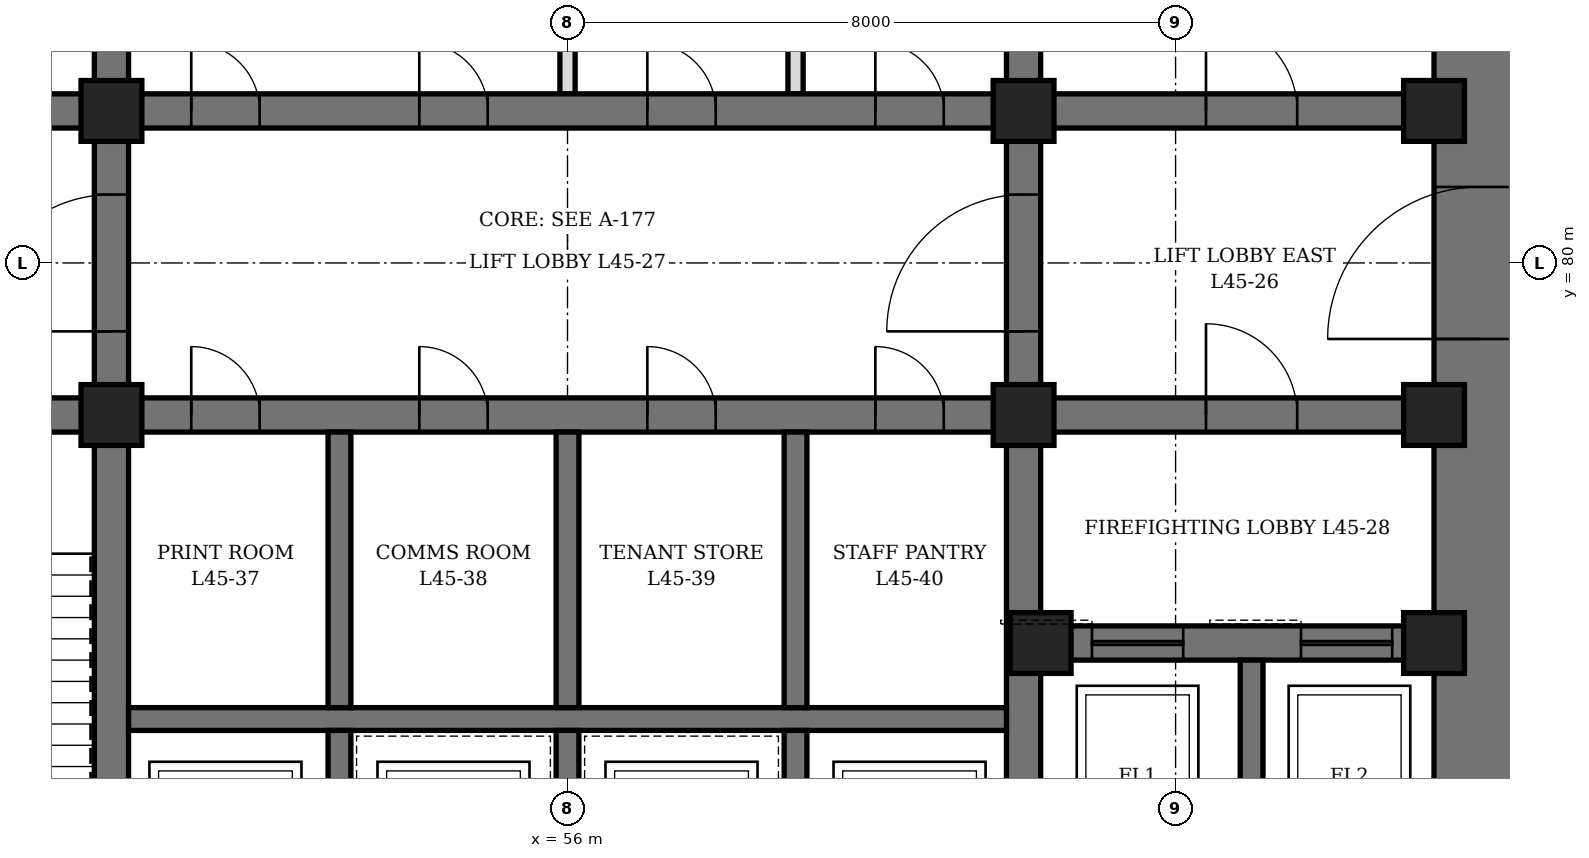
"""IFC4 building model, lengths in metres.
Left out: names, types, materials, properties, quantities, classifications, styles, units other than length and angle.
Written with IfcOpenShell. Run it as: python <this file> out.ifc"""

import sys

from ifc_helpers import new_model, si_unit, direction, frame, frame_2d, origin, origin_2d, place, context, subcontext, project, spatial, rectangle, hollow_rectangle, extrude, element, fill, save


model = new_model("IFC4")
c1 = context("Model", 3, precision=1e-05, world=origin(), true_north=direction((0.0, 1.0)))
c2 = subcontext(c1, "Body", "Model", "MODEL_VIEW")
j1 = project(units=[si_unit("LENGTHUNIT", "METRE"), si_unit("PLANEANGLEUNIT", "RADIAN")], contexts=[c1])
p1 = place(None, origin())
s1 = spatial("IfcSite", under=j1, at=p1, CompositionType="ELEMENT")
p2 = place(p1, origin())
s2 = spatial("IfcBuilding", under=s1, at=p2, CompositionType="ELEMENT")
p3 = place(p2, frame((0.0, 0.0, 202.3)))
s3 = spatial("IfcBuildingStorey", under=s2, at=p3, CompositionType="ELEMENT", Elevation=202.3)
p4 = place(p3, frame((68.0, 70.4, 0.0), z_axis=(0.0, 0.0, 1.0), x_axis=(0.0, 1.0, 0.0)))
e1 = element("IfcWall", 1, at=p4, inside=s3, PredefinedType="SHEAR", context=c2, shape_type="SweptSolid", body=[
    extrude(rectangle(XDim=19.2, YDim=1.2, at=frame_2d((9.6, 0.0))), origin(), (0.0, 0.0, 1.0), 4.2),
])
p5 = place(p4, frame((8.6, 0.0, 0.0)))
e2 = element("IfcOpeningElement", 2, at=p5, cuts=e1, PredefinedType="OPENING", context=c2, shape_type="SweptSolid", body=[
    extrude(rectangle(XDim=2.0, YDim=2.4, at=frame_2d((1.0, 1.2))), frame((0.0, 0.61, 0.0), z_axis=(0.0, -1.0, 0.0), x_axis=(1.0, 0.0, 0.0)), (0.0, 0.0, 1.0), 1.22),
])
p6 = place(p3, frame((50.0, 71.6, 0.0), z_axis=(0.0, 0.0, 1.0), x_axis=(0.0, 1.0, 0.0)))
e3 = element("IfcWall", 3, at=p6, inside=s3, PredefinedType="SHEAR", context=c2, shape_type="SweptSolid", body=[
    extrude(rectangle(XDim=16.8, YDim=0.45, at=frame_2d((8.4, 0.0))), origin(), (0.0, 0.0, 1.0), 4.2),
])
p7 = place(p6, frame((7.5, 0.0, 0.0)))
e4 = element("IfcOpeningElement", 4, at=p7, cuts=e3, PredefinedType="OPENING", context=c2, shape_type="SweptSolid", body=[
    extrude(rectangle(XDim=1.8, YDim=2.4, at=frame_2d((0.9, 1.2))), frame((0.0, 0.235, 0.0), z_axis=(0.0, -1.0, 0.0), x_axis=(1.0, 0.0, 0.0)), (0.0, 0.0, 1.0), 0.47),
])
p8 = place(p3, frame((62.0, 71.6, 0.0), z_axis=(0.0, 0.0, 1.0), x_axis=(0.0, 1.0, 0.0)))
e5 = element("IfcWall", 5, at=p8, inside=s3, PredefinedType="SHEAR", context=c2, shape_type="SweptSolid", body=[
    extrude(rectangle(XDim=16.8, YDim=0.45, at=frame_2d((8.4, 0.0))), origin(), (0.0, 0.0, 1.0), 4.2),
])
p9 = place(p8, frame((7.5, 0.0, 0.0)))
e6 = element("IfcOpeningElement", 6, at=p9, cuts=e5, PredefinedType="OPENING", context=c2, shape_type="SweptSolid", body=[
    extrude(rectangle(XDim=1.8, YDim=2.4, at=frame_2d((0.9, 1.2))), frame((0.0, 0.235, 0.0), z_axis=(0.0, -1.0, 0.0), x_axis=(1.0, 0.0, 0.0)), (0.0, 0.0, 1.0), 0.47),
])
p10 = place(p3, frame((44.6, 78.0, 0.0), z_axis=(0.0, 0.0, 1.0), x_axis=(1.0, 0.0, 0.0)))
e7 = element("IfcWall", 7, at=p10, inside=s3, PredefinedType="SHEAR", context=c2, shape_type="SweptSolid", body=[
    extrude(rectangle(XDim=5.175, YDim=0.45, at=frame_2d((2.587, 0.0))), origin(), (0.0, 0.0, 1.0), 4.2),
])
p11 = place(p10, frame((1.8, 0.0, 0.0)))
e8 = element("IfcOpeningElement", 8, at=p11, cuts=e7, PredefinedType="OPENING", context=c2, shape_type="SweptSolid", body=[
    extrude(rectangle(XDim=1.2, YDim=2.1, at=frame_2d((0.6, 1.05))), frame((0.0, 0.235, 0.0), z_axis=(0.0, -1.0, 0.0), x_axis=(1.0, 0.0, 0.0)), (0.0, 0.0, 1.0), 0.47),
])
p12 = place(p3, frame((44.6, 82.0, 0.0), z_axis=(0.0, 0.0, 1.0), x_axis=(1.0, 0.0, 0.0)))
e9 = element("IfcWall", 9, at=p12, inside=s3, PredefinedType="SHEAR", context=c2, shape_type="SweptSolid", body=[
    extrude(rectangle(XDim=5.175, YDim=0.45, at=frame_2d((2.587, 0.0))), origin(), (0.0, 0.0, 1.0), 4.2),
])
p13 = place(p12, frame((0.7, 0.0, 0.0)))
e10 = element("IfcOpeningElement", 10, at=p13, cuts=e9, PredefinedType="OPENING", context=c2, shape_type="SweptSolid", body=[
    extrude(rectangle(XDim=0.9, YDim=2.1, at=frame_2d((0.45, 1.05))), frame((0.0, 0.235, 0.0), z_axis=(0.0, -1.0, 0.0), x_axis=(1.0, 0.0, 0.0)), (0.0, 0.0, 1.0), 0.47),
])
p14 = place(p3, frame((62.225, 75.0, 0.0), z_axis=(0.0, 0.0, 1.0), x_axis=(1.0, 0.0, 0.0)))
e11 = element("IfcWall", 11, at=p14, inside=s3, PredefinedType="SHEAR", context=c2, shape_type="SweptSolid", body=[
    extrude(rectangle(XDim=5.175, YDim=0.45, at=frame_2d((2.587, 0.0))), origin(), (0.0, 0.0, 1.0), 4.2),
])
p15 = place(p14, frame((0.675, 0.0, 0.0)))
e12 = element("IfcOpeningElement", 12, at=p15, cuts=e11, PredefinedType="OPENING", context=c2, shape_type="SweptSolid", body=[
    extrude(rectangle(XDim=1.2, YDim=2.2, at=frame_2d((0.6, 1.1))), frame((0.0, 0.235, 0.0), z_axis=(0.0, -1.0, 0.0), x_axis=(1.0, 0.0, 0.0)), (0.0, 0.0, 1.0), 0.47),
])
p16 = place(p14, frame((3.425, 0.0, 0.0)))
e13 = element("IfcOpeningElement", 13, at=p16, cuts=e11, PredefinedType="OPENING", context=c2, shape_type="SweptSolid", body=[
    extrude(rectangle(XDim=1.2, YDim=2.2, at=frame_2d((0.6, 1.1))), frame((0.0, 0.235, 0.0), z_axis=(0.0, -1.0, 0.0), x_axis=(1.0, 0.0, 0.0)), (0.0, 0.0, 1.0), 0.47),
])
p17 = place(p3, frame((62.225, 78.0, 0.0), z_axis=(0.0, 0.0, 1.0), x_axis=(1.0, 0.0, 0.0)))
e14 = element("IfcWall", 14, at=p17, inside=s3, PredefinedType="SHEAR", context=c2, shape_type="SweptSolid", body=[
    extrude(rectangle(XDim=5.175, YDim=0.45, at=frame_2d((2.587, 0.0))), origin(), (0.0, 0.0, 1.0), 4.2),
])
p18 = place(p17, frame((2.175, 0.0, 0.0)))
e15 = element("IfcOpeningElement", 15, at=p18, cuts=e14, PredefinedType="OPENING", context=c2, shape_type="SweptSolid", body=[
    extrude(rectangle(XDim=1.2, YDim=2.1, at=frame_2d((0.6, 1.05))), frame((0.0, 0.235, 0.0), z_axis=(0.0, -1.0, 0.0), x_axis=(1.0, 0.0, 0.0)), (0.0, 0.0, 1.0), 0.47),
])
p19 = place(p3, frame((62.225, 82.0, 0.0), z_axis=(0.0, 0.0, 1.0), x_axis=(1.0, 0.0, 0.0)))
e16 = element("IfcWall", 16, at=p19, inside=s3, PredefinedType="SHEAR", context=c2, shape_type="SweptSolid", body=[
    extrude(rectangle(XDim=5.175, YDim=0.45, at=frame_2d((2.587, 0.0))), origin(), (0.0, 0.0, 1.0), 4.2),
])
p20 = place(p19, frame((2.175, 0.0, 0.0)))
e17 = element("IfcOpeningElement", 17, at=p20, cuts=e16, PredefinedType="OPENING", context=c2, shape_type="SweptSolid", body=[
    extrude(rectangle(XDim=1.2, YDim=2.1, at=frame_2d((0.6, 1.05))), frame((0.0, 0.235, 0.0), z_axis=(0.0, -1.0, 0.0), x_axis=(1.0, 0.0, 0.0)), (0.0, 0.0, 1.0), 0.47),
])
p21 = place(p3, frame((50.225, 78.0, 0.0), z_axis=(0.0, 0.0, 1.0), x_axis=(1.0, 0.0, 0.0)))
e18 = element("IfcWall", 18, at=p21, inside=s3, PredefinedType="SHEAR", context=c2, shape_type="SweptSolid", body=[
    extrude(rectangle(XDim=11.55, YDim=0.45, at=frame_2d((5.775, 0.0))), origin(), (0.0, 0.0, 1.0), 4.2),
])
p22 = place(p21, frame((0.825, 0.0, 0.0)))
e19 = element("IfcOpeningElement", 19, at=p22, cuts=e18, PredefinedType="OPENING", context=c2, shape_type="SweptSolid", body=[
    extrude(rectangle(XDim=0.9, YDim=2.1, at=frame_2d((0.45, 1.05))), frame((0.0, 0.235, 0.0), z_axis=(0.0, -1.0, 0.0), x_axis=(1.0, 0.0, 0.0)), (0.0, 0.0, 1.0), 0.47),
])
p23 = place(p21, frame((3.825, 0.0, 0.0)))
e20 = element("IfcOpeningElement", 20, at=p23, cuts=e18, PredefinedType="OPENING", context=c2, shape_type="SweptSolid", body=[
    extrude(rectangle(XDim=0.9, YDim=2.1, at=frame_2d((0.45, 1.05))), frame((0.0, 0.235, 0.0), z_axis=(0.0, -1.0, 0.0), x_axis=(1.0, 0.0, 0.0)), (0.0, 0.0, 1.0), 0.47),
])
p24 = place(p21, frame((6.825, 0.0, 0.0)))
e21 = element("IfcOpeningElement", 21, at=p24, cuts=e18, PredefinedType="OPENING", context=c2, shape_type="SweptSolid", body=[
    extrude(rectangle(XDim=0.9, YDim=2.1, at=frame_2d((0.45, 1.05))), frame((0.0, 0.235, 0.0), z_axis=(0.0, -1.0, 0.0), x_axis=(1.0, 0.0, 0.0)), (0.0, 0.0, 1.0), 0.47),
])
p25 = place(p21, frame((9.825, 0.0, 0.0)))
e22 = element("IfcOpeningElement", 22, at=p25, cuts=e18, PredefinedType="OPENING", context=c2, shape_type="SweptSolid", body=[
    extrude(rectangle(XDim=0.9, YDim=2.1, at=frame_2d((0.45, 1.05))), frame((0.0, 0.235, 0.0), z_axis=(0.0, -1.0, 0.0), x_axis=(1.0, 0.0, 0.0)), (0.0, 0.0, 1.0), 0.47),
])
p26 = place(p3, frame((50.225, 82.0, 0.0), z_axis=(0.0, 0.0, 1.0), x_axis=(1.0, 0.0, 0.0)))
e23 = element("IfcWall", 23, at=p26, inside=s3, PredefinedType="SHEAR", context=c2, shape_type="SweptSolid", body=[
    extrude(rectangle(XDim=11.55, YDim=0.45, at=frame_2d((5.775, 0.0))), origin(), (0.0, 0.0, 1.0), 4.2),
])
p27 = place(p26, frame((0.825, 0.0, 0.0)))
e24 = element("IfcOpeningElement", 24, at=p27, cuts=e23, PredefinedType="OPENING", context=c2, shape_type="SweptSolid", body=[
    extrude(rectangle(XDim=0.9, YDim=2.1, at=frame_2d((0.45, 1.05))), frame((0.0, 0.235, 0.0), z_axis=(0.0, -1.0, 0.0), x_axis=(1.0, 0.0, 0.0)), (0.0, 0.0, 1.0), 0.47),
])
p28 = place(p26, frame((3.825, 0.0, 0.0)))
e25 = element("IfcOpeningElement", 25, at=p28, cuts=e23, PredefinedType="OPENING", context=c2, shape_type="SweptSolid", body=[
    extrude(rectangle(XDim=0.9, YDim=2.1, at=frame_2d((0.45, 1.05))), frame((0.0, 0.235, 0.0), z_axis=(0.0, -1.0, 0.0), x_axis=(1.0, 0.0, 0.0)), (0.0, 0.0, 1.0), 0.47),
])
p29 = place(p26, frame((6.825, 0.0, 0.0)))
e26 = element("IfcOpeningElement", 26, at=p29, cuts=e23, PredefinedType="OPENING", context=c2, shape_type="SweptSolid", body=[
    extrude(rectangle(XDim=0.9, YDim=2.1, at=frame_2d((0.45, 1.05))), frame((0.0, 0.235, 0.0), z_axis=(0.0, -1.0, 0.0), x_axis=(1.0, 0.0, 0.0)), (0.0, 0.0, 1.0), 0.47),
])
p30 = place(p26, frame((9.825, 0.0, 0.0)))
e27 = element("IfcOpeningElement", 27, at=p30, cuts=e23, PredefinedType="OPENING", context=c2, shape_type="SweptSolid", body=[
    extrude(rectangle(XDim=0.9, YDim=2.1, at=frame_2d((0.45, 1.05))), frame((0.0, 0.235, 0.0), z_axis=(0.0, -1.0, 0.0), x_axis=(1.0, 0.0, 0.0)), (0.0, 0.0, 1.0), 0.47),
])
p31 = place(p3, frame((50.225, 74.0, 0.0), z_axis=(0.0, 0.0, 1.0), x_axis=(1.0, 0.0, 0.0)))
e28 = element("IfcWall", 28, at=p31, inside=s3, PredefinedType="SHEAR", context=c2, shape_type="SweptSolid", body=[
    extrude(rectangle(XDim=11.55, YDim=0.3, at=frame_2d((5.775, 0.0))), origin(), (0.0, 0.0, 1.0), 4.2),
])
p32 = place(p3, frame((53.0, 71.6, 0.0), z_axis=(0.0, 0.0, 1.0), x_axis=(0.0, 1.0, 0.0)))
e29 = element("IfcWall", 29, at=p32, inside=s3, PredefinedType="SHEAR", context=c2, shape_type="SweptSolid", body=[
    extrude(rectangle(XDim=2.25, YDim=0.3, at=frame_2d((1.125, 0.0))), origin(), (0.0, 0.0, 1.0), 4.2),
])
p33 = place(p3, frame((53.0, 74.15, 0.0), z_axis=(0.0, 0.0, 1.0), x_axis=(0.0, 1.0, 0.0)))
e30 = element("IfcWall", 30, at=p33, inside=s3, PredefinedType="SHEAR", context=c2, shape_type="SweptSolid", body=[
    extrude(rectangle(XDim=3.625, YDim=0.3, at=frame_2d((1.812, 0.0))), origin(), (0.0, 0.0, 1.0), 4.2),
])
p34 = place(p3, frame((56.0, 71.6, 0.0), z_axis=(0.0, 0.0, 1.0), x_axis=(0.0, 1.0, 0.0)))
e31 = element("IfcWall", 31, at=p34, inside=s3, PredefinedType="SHEAR", context=c2, shape_type="SweptSolid", body=[
    extrude(rectangle(XDim=2.25, YDim=0.3, at=frame_2d((1.125, 0.0))), origin(), (0.0, 0.0, 1.0), 4.2),
])
p35 = place(p3, frame((56.0, 74.15, 0.0), z_axis=(0.0, 0.0, 1.0), x_axis=(0.0, 1.0, 0.0)))
e32 = element("IfcWall", 32, at=p35, inside=s3, PredefinedType="SHEAR", context=c2, shape_type="SweptSolid", body=[
    extrude(rectangle(XDim=3.625, YDim=0.3, at=frame_2d((1.812, 0.0))), origin(), (0.0, 0.0, 1.0), 4.2),
])
p36 = place(p3, frame((59.0, 71.6, 0.0), z_axis=(0.0, 0.0, 1.0), x_axis=(0.0, 1.0, 0.0)))
e33 = element("IfcWall", 33, at=p36, inside=s3, PredefinedType="SHEAR", context=c2, shape_type="SweptSolid", body=[
    extrude(rectangle(XDim=2.25, YDim=0.3, at=frame_2d((1.125, 0.0))), origin(), (0.0, 0.0, 1.0), 4.2),
])
p37 = place(p3, frame((59.0, 74.15, 0.0), z_axis=(0.0, 0.0, 1.0), x_axis=(0.0, 1.0, 0.0)))
e34 = element("IfcWall", 34, at=p37, inside=s3, PredefinedType="SHEAR", context=c2, shape_type="SweptSolid", body=[
    extrude(rectangle(XDim=3.625, YDim=0.3, at=frame_2d((1.812, 0.0))), origin(), (0.0, 0.0, 1.0), 4.2),
])
p38 = place(p3, frame((65.0, 71.6, 0.0), z_axis=(0.0, 0.0, 1.0), x_axis=(0.0, 1.0, 0.0)))
e35 = element("IfcWall", 35, at=p38, inside=s3, PredefinedType="SHEAR", context=c2, shape_type="SweptSolid", body=[
    extrude(rectangle(XDim=3.175, YDim=0.3, at=frame_2d((1.587, 0.0))), origin(), (0.0, 0.0, 1.0), 4.2),
])
for number, where, z_axis, x_axis in (
    (36, (50.0, 78.0, 0.0), (0.0, 0.0, 1.0), (1.0, 0.0, 0.0)),
    (37, (50.0, 82.0, 0.0), (0.0, 0.0, 1.0), (1.0, 0.0, 0.0)),
    (38, (62.0, 78.0, 0.0), (0.0, 0.0, 1.0), (1.0, 0.0, 0.0)),
    (39, (62.0, 82.0, 0.0), (0.0, 0.0, 1.0), (1.0, 0.0, 0.0)),
    (40, (62.225, 75.0, 0.0), (0.0, 0.0, 1.0), (1.0, 0.0, 0.0)),
    (41, (67.4, 75.0, 0.0), (0.0, 0.0, 1.0), (1.0, 0.0, 0.0)),
    (42, (67.4, 78.0, 0.0), (0.0, 0.0, 1.0), (1.0, 0.0, 0.0)),
    (43, (67.4, 82.0, 0.0), (0.0, 0.0, 1.0), (1.0, 0.0, 0.0)),
):
    element("IfcColumn", number, at=place(p3, frame(where, z_axis=z_axis, x_axis=x_axis)), inside=s3, PredefinedType="COLUMN", context=c2, shape_type="SweptSolid", body=[
        extrude(hollow_rectangle(XDim=0.8, YDim=0.8, WallThickness=0.1, at=origin_2d()), origin(), (0.0, 0.0, 1.0), 4.2),
    ])
p39 = place(p3, frame((56.0, 82.225, 0.0), z_axis=(0.0, 0.0, 1.0), x_axis=(0.0, 1.0, 0.0)))
e44 = element("IfcWall", 44, at=p39, inside=s3, PredefinedType="PARTITIONING", context=c2, shape_type="SweptSolid", body=[
    extrude(rectangle(XDim=3.55, YDim=0.2, at=frame_2d((1.775, 0.0))), origin(), (0.0, 0.0, 1.0), 3.14),
])
p40 = place(p3, frame((59.0, 82.225, 0.0), z_axis=(0.0, 0.0, 1.0), x_axis=(0.0, 1.0, 0.0)))
e45 = element("IfcWall", 45, at=p40, inside=s3, PredefinedType="PARTITIONING", context=c2, shape_type="SweptSolid", body=[
    extrude(rectangle(XDim=3.55, YDim=0.2, at=frame_2d((1.775, 0.0))), origin(), (0.0, 0.0, 1.0), 4.04),
])
p41 = place(p22, origin())
e46 = element("IfcDoor", 46, at=p41, inside=s3, OperationType="SINGLE_SWING_LEFT", PredefinedType="DOOR", context=c2, shape_type="SweptSolid", body=[
    extrude(rectangle(XDim=0.9, YDim=2.1, at=frame_2d((0.45, 1.05))), frame((0.0, 0.225, 0.0), z_axis=(0.0, -1.0, 0.0), x_axis=(1.0, 0.0, 0.0)), (0.0, 0.0, 1.0), 0.449),
])
fill(e19, e46)
p42 = place(p23, origin())
e47 = element("IfcDoor", 47, at=p42, inside=s3, OperationType="SINGLE_SWING_LEFT", PredefinedType="DOOR", context=c2, shape_type="SweptSolid", body=[
    extrude(rectangle(XDim=0.9, YDim=2.1, at=frame_2d((0.45, 1.05))), frame((0.0, 0.225, 0.0), z_axis=(0.0, -1.0, 0.0), x_axis=(1.0, 0.0, 0.0)), (0.0, 0.0, 1.0), 0.449),
])
fill(e20, e47)
p43 = place(p24, origin())
e48 = element("IfcDoor", 48, at=p43, inside=s3, OperationType="SINGLE_SWING_LEFT", PredefinedType="DOOR", context=c2, shape_type="SweptSolid", body=[
    extrude(rectangle(XDim=0.9, YDim=2.1, at=frame_2d((0.45, 1.05))), frame((0.0, 0.225, 0.0), z_axis=(0.0, -1.0, 0.0), x_axis=(1.0, 0.0, 0.0)), (0.0, 0.0, 1.0), 0.449),
])
fill(e21, e48)
p44 = place(p25, origin())
e49 = element("IfcDoor", 49, at=p44, inside=s3, OperationType="SINGLE_SWING_LEFT", PredefinedType="DOOR", context=c2, shape_type="SweptSolid", body=[
    extrude(rectangle(XDim=0.9, YDim=2.1, at=frame_2d((0.45, 1.05))), frame((0.0, 0.225, 0.0), z_axis=(0.0, -1.0, 0.0), x_axis=(1.0, 0.0, 0.0)), (0.0, 0.0, 1.0), 0.449),
])
fill(e22, e49)
p45 = place(p27, origin())
e50 = element("IfcDoor", 50, at=p45, inside=s3, OperationType="SINGLE_SWING_LEFT", PredefinedType="DOOR", context=c2, shape_type="SweptSolid", body=[
    extrude(rectangle(XDim=0.9, YDim=2.1, at=frame_2d((0.45, 1.05))), frame((0.0, 0.225, 0.0), z_axis=(0.0, -1.0, 0.0), x_axis=(1.0, 0.0, 0.0)), (0.0, 0.0, 1.0), 0.449),
])
fill(e24, e50)
p46 = place(p28, origin())
e51 = element("IfcDoor", 51, at=p46, inside=s3, OperationType="SINGLE_SWING_LEFT", PredefinedType="DOOR", context=c2, shape_type="SweptSolid", body=[
    extrude(rectangle(XDim=0.9, YDim=2.1, at=frame_2d((0.45, 1.05))), frame((0.0, 0.225, 0.0), z_axis=(0.0, -1.0, 0.0), x_axis=(1.0, 0.0, 0.0)), (0.0, 0.0, 1.0), 0.449),
])
fill(e25, e51)
p47 = place(p29, origin())
e52 = element("IfcDoor", 52, at=p47, inside=s3, OperationType="SINGLE_SWING_LEFT", PredefinedType="DOOR", context=c2, shape_type="SweptSolid", body=[
    extrude(rectangle(XDim=0.9, YDim=2.1, at=frame_2d((0.45, 1.05))), frame((0.0, 0.225, 0.0), z_axis=(0.0, -1.0, 0.0), x_axis=(1.0, 0.0, 0.0)), (0.0, 0.0, 1.0), 0.449),
])
fill(e26, e52)
p48 = place(p30, origin())
e53 = element("IfcDoor", 53, at=p48, inside=s3, OperationType="SINGLE_SWING_LEFT", PredefinedType="DOOR", context=c2, shape_type="SweptSolid", body=[
    extrude(rectangle(XDim=0.9, YDim=2.1, at=frame_2d((0.45, 1.05))), frame((0.0, 0.225, 0.0), z_axis=(0.0, -1.0, 0.0), x_axis=(1.0, 0.0, 0.0)), (0.0, 0.0, 1.0), 0.449),
])
fill(e27, e53)
p49 = place(p20, origin())
e54 = element("IfcDoor", 54, at=p49, inside=s3, OperationType="SINGLE_SWING_LEFT", PredefinedType="DOOR", context=c2, shape_type="SweptSolid", body=[
    extrude(rectangle(XDim=1.2, YDim=2.1, at=frame_2d((0.6, 1.05))), frame((0.0, 0.225, 0.0), z_axis=(0.0, -1.0, 0.0), x_axis=(1.0, 0.0, 0.0)), (0.0, 0.0, 1.0), 0.449),
])
fill(e17, e54)
p50 = place(p5, origin())
e55 = element("IfcDoor", 55, at=p50, inside=s3, OperationType="DOUBLE_DOOR_SINGLE_SWING", PredefinedType="DOOR", context=c2, shape_type="SweptSolid", body=[
    extrude(rectangle(XDim=2.0, YDim=2.4, at=frame_2d((1.0, 1.2))), frame((0.0, 0.35, 0.0), z_axis=(0.0, -1.0, 0.0), x_axis=(1.0, 0.0, 0.0)), (0.0, 0.0, 1.0), 0.7),
])
fill(e2, e55)
p51 = place(p7, origin())
e56 = element("IfcDoor", 56, at=p51, inside=s3, OperationType="DOUBLE_DOOR_SINGLE_SWING", PredefinedType="DOOR", context=c2, shape_type="SweptSolid", body=[
    extrude(rectangle(XDim=1.8, YDim=2.4, at=frame_2d((0.9, 1.2))), frame((0.0, 0.225, 0.0), z_axis=(0.0, -1.0, 0.0), x_axis=(1.0, 0.0, 0.0)), (0.0, 0.0, 1.0), 0.449),
])
fill(e4, e56)
p52 = place(p9, origin())
e57 = element("IfcDoor", 57, at=p52, inside=s3, OperationType="DOUBLE_DOOR_SINGLE_SWING", PredefinedType="DOOR", context=c2, shape_type="SweptSolid", body=[
    extrude(rectangle(XDim=1.8, YDim=2.4, at=frame_2d((0.9, 1.2))), frame((0.0, 0.225, 0.0), z_axis=(0.0, -1.0, 0.0), x_axis=(1.0, 0.0, 0.0)), (0.0, 0.0, 1.0), 0.449),
])
fill(e6, e57)
p53 = place(p18, origin())
e58 = element("IfcDoor", 58, at=p53, inside=s3, OperationType="SINGLE_SWING_RIGHT", PredefinedType="DOOR", context=c2, shape_type="SweptSolid", body=[
    extrude(rectangle(XDim=1.2, YDim=2.1, at=frame_2d((0.6, 1.05))), frame((0.0, 0.225, 0.0), z_axis=(0.0, -1.0, 0.0), x_axis=(1.0, 0.0, 0.0)), (0.0, 0.0, 1.0), 0.449),
])
fill(e15, e58)
p54 = place(p15, origin())
e59 = element("IfcDoor", 59, at=p54, inside=s3, OperationType="SLIDING_TO_LEFT", PredefinedType="DOOR", context=c2, shape_type="SweptSolid", body=[
    extrude(rectangle(XDim=1.2, YDim=2.2, at=frame_2d((0.6, 1.1))), frame((0.0, 0.225, 0.0), z_axis=(0.0, -1.0, 0.0), x_axis=(1.0, 0.0, 0.0)), (0.0, 0.0, 1.0), 0.449),
])
fill(e12, e59)
p55 = place(p16, origin())
e60 = element("IfcDoor", 60, at=p55, inside=s3, OperationType="SLIDING_TO_LEFT", PredefinedType="DOOR", context=c2, shape_type="SweptSolid", body=[
    extrude(rectangle(XDim=1.2, YDim=2.2, at=frame_2d((0.6, 1.1))), frame((0.0, 0.225, 0.0), z_axis=(0.0, -1.0, 0.0), x_axis=(1.0, 0.0, 0.0)), (0.0, 0.0, 1.0), 0.449),
])
fill(e13, e60)
save(model, sys.argv[1])
